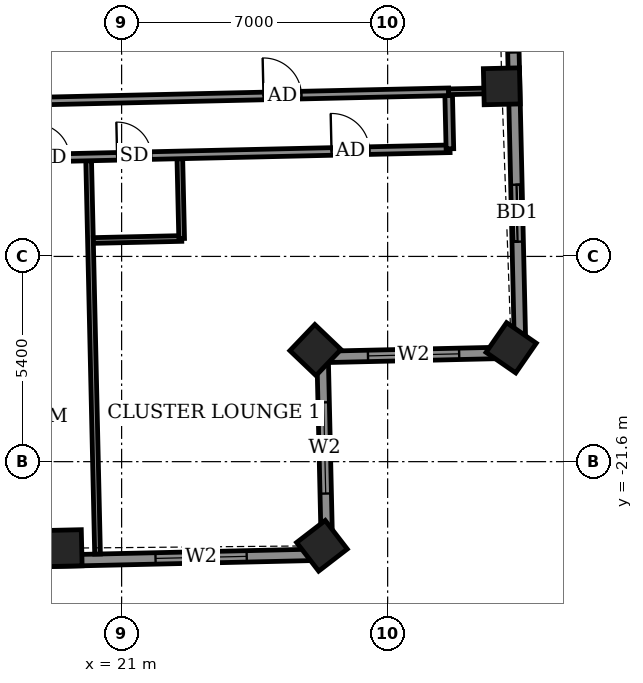
"""IFC4 building model, lengths in metres.
Left out: names, types, materials, properties, quantities, classifications, styles, units other than length and angle.
Written with IfcOpenShell. Run it as: python <this file> out.ifc"""

import sys

from ifc_helpers import new_model, si_unit, direction, frame, frame_2d, origin, origin_2d, place, context, subcontext, project, spatial, rectangle, extrude, element, fill, save


model = new_model("IFC4")
c1 = context("Model", 3, precision=1e-05, world=origin(), true_north=direction((0.0, 1.0)))
c2 = subcontext(c1, "Body", "Model", "MODEL_VIEW")
j1 = project(units=[si_unit("LENGTHUNIT", "METRE"), si_unit("PLANEANGLEUNIT", "RADIAN")], contexts=[c1])
p1 = place(None, origin())
s1 = spatial("IfcSite", under=j1, at=p1, CompositionType="ELEMENT")
p2 = place(p1, origin())
s2 = spatial("IfcBuilding", under=s1, at=p2, CompositionType="ELEMENT")
p3 = place(p2, frame((0.0, 0.0, 290.7)))
s3 = spatial("IfcBuildingStorey", under=s2, at=p3, CompositionType="ELEMENT", Elevation=290.7)
for number, where, z_axis, x_axis in (
    (1, (19.475, -23.876, -0.55), (0.0, 0.0, 1.0), (1.0, 0.023, 0.0)),
    (2, (26.271, -23.814, -0.55), (0.0, 0.0, 1.0), (0.792, 0.61, 0.0)),
    (3, (26.1, -18.664, -0.55), (0.0, 0.0, 1.0), (0.691, 0.723, 0.0)),
    (4, (31.25, -18.604, -0.55), (0.0, 0.0, 1.0), (0.569, 0.822, 0.0)),
    (5, (31.004, -11.724, -0.55), (0.0, 0.0, 1.0), (-0.023, 1.0, 0.0)),
):
    element("IfcColumn", number, at=place(p3, frame(where, z_axis=z_axis, x_axis=x_axis)), inside=s3, PredefinedType="COLUMN", context=c2, shape_type="SweptSolid", body=[
        extrude(rectangle(XDim=0.95, YDim=0.95, at=origin_2d()), origin(), (0.0, 0.0, 1.0), 3.6),
    ])
p4 = place(p3, frame((31.488, -18.727, 0.0), z_axis=(0.0, 0.0, 1.0), x_axis=(-0.022666132143, 0.999743090226, 0.0)))
e6 = element("IfcWall", 6, at=p4, inside=s3, PredefinedType="SOLIDWALL", context=c2, shape_type="SweptSolid", body=[
    extrude(rectangle(XDim=14.649, YDim=0.3, at=frame_2d((7.324, 0.0))), origin(), (0.0, 0.0, 1.0), 2.5),
])
p5 = place(p4, frame((2.915, 0.0, 0.0)))
e7 = element("IfcOpeningElement", 7, at=p5, cuts=e6, PredefinedType="OPENING", context=c2, shape_type="SweptSolid", body=[
    extrude(rectangle(XDim=1.5, YDim=2.4, at=frame_2d((0.75, 1.2))), frame((0.0, 0.16, 0.0), z_axis=(0.0, -1.0, 0.0), x_axis=(1.0, 0.0, 0.0)), (0.0, 0.0, 1.0), 0.32),
])
p6 = place(p4, frame((7.895, 0.0, 0.9)))
e8 = element("IfcOpeningElement", 8, at=p6, cuts=e6, PredefinedType="OPENING", context=c2, shape_type="SweptSolid", body=[
    extrude(rectangle(XDim=2.4, YDim=1.5, at=frame_2d((1.2, 0.75))), frame((0.0, 0.16, 0.0), z_axis=(0.0, -1.0, 0.0), x_axis=(1.0, 0.0, 0.0)), (0.0, 0.0, 1.0), 0.32),
])
p7 = place(p3, frame((-22.816, -25.161, 0.0), z_axis=(0.0, 0.0, 1.0), x_axis=(0.999742646411, 0.022685699159, 0.0)))
e9 = element("IfcWall", 9, at=p7, inside=s3, PredefinedType="SOLIDWALL", context=c2, shape_type="SweptSolid", body=[
    extrude(rectangle(XDim=49.236, YDim=0.3, at=frame_2d((24.618, 0.0))), origin(), (0.0, 0.0, 1.0), 2.5),
])
p8 = place(p7, frame((0.953, 0.0, 0.0)))
e10 = element("IfcOpeningElement", 10, at=p8, cuts=e9, PredefinedType="OPENING", context=c2, shape_type="SweptSolid", body=[
    extrude(rectangle(XDim=1.5, YDim=2.4, at=frame_2d((0.75, 1.2))), frame((0.0, 0.16, 0.0), z_axis=(0.0, -1.0, 0.0), x_axis=(1.0, 0.0, 0.0)), (0.0, 0.0, 1.0), 0.32),
])
p9 = place(p7, frame((4.051, 0.0, 0.0)))
e11 = element("IfcOpeningElement", 11, at=p9, cuts=e9, PredefinedType="OPENING", context=c2, shape_type="SweptSolid", body=[
    extrude(rectangle(XDim=1.5, YDim=2.4, at=frame_2d((0.75, 1.2))), frame((0.0, 0.16, 0.0), z_axis=(0.0, -1.0, 0.0), x_axis=(1.0, 0.0, 0.0)), (0.0, 0.0, 1.0), 0.32),
])
p10 = place(p7, frame((8.725, 0.0, 0.0)))
e12 = element("IfcOpeningElement", 12, at=p10, cuts=e9, PredefinedType="OPENING", context=c2, shape_type="SweptSolid", body=[
    extrude(rectangle(XDim=1.5, YDim=2.4, at=frame_2d((0.75, 1.2))), frame((0.0, 0.16, 0.0), z_axis=(0.0, -1.0, 0.0), x_axis=(1.0, 0.0, 0.0)), (0.0, 0.0, 1.0), 0.32),
])
p11 = place(p7, frame((12.139, 0.0, 0.0)))
e13 = element("IfcOpeningElement", 13, at=p11, cuts=e9, PredefinedType="OPENING", context=c2, shape_type="SweptSolid", body=[
    extrude(rectangle(XDim=1.2, YDim=2.4, at=frame_2d((0.6, 1.2))), frame((0.0, 0.16, 0.0), z_axis=(0.0, -1.0, 0.0), x_axis=(1.0, 0.0, 0.0)), (0.0, 0.0, 1.0), 0.32),
])
p12 = place(p7, frame((17.6, 0.0, 0.0)))
e14 = element("IfcOpeningElement", 14, at=p12, cuts=e9, PredefinedType="OPENING", context=c2, shape_type="SweptSolid", body=[
    extrude(rectangle(XDim=1.5, YDim=2.4, at=frame_2d((0.75, 1.2))), frame((0.0, 0.16, 0.0), z_axis=(0.0, -1.0, 0.0), x_axis=(1.0, 0.0, 0.0)), (0.0, 0.0, 1.0), 0.32),
])
p13 = place(p7, frame((22.453, 0.0, 0.0)))
e15 = element("IfcOpeningElement", 15, at=p13, cuts=e9, PredefinedType="OPENING", context=c2, shape_type="SweptSolid", body=[
    extrude(rectangle(XDim=1.5, YDim=2.4, at=frame_2d((0.75, 1.2))), frame((0.0, 0.16, 0.0), z_axis=(0.0, -1.0, 0.0), x_axis=(1.0, 0.0, 0.0)), (0.0, 0.0, 1.0), 0.32),
])
p14 = place(p7, frame((25.765, 0.0, 0.0)))
e16 = element("IfcOpeningElement", 16, at=p14, cuts=e9, PredefinedType="OPENING", context=c2, shape_type="SweptSolid", body=[
    extrude(rectangle(XDim=1.5, YDim=2.4, at=frame_2d((0.75, 1.2))), frame((0.0, 0.16, 0.0), z_axis=(0.0, -1.0, 0.0), x_axis=(1.0, 0.0, 0.0)), (0.0, 0.0, 1.0), 0.32),
])
p15 = place(p7, frame((31.25, 0.0, 0.0)))
e17 = element("IfcOpeningElement", 17, at=p15, cuts=e9, PredefinedType="OPENING", context=c2, shape_type="SweptSolid", body=[
    extrude(rectangle(XDim=1.5, YDim=2.4, at=frame_2d((0.75, 1.2))), frame((0.0, 0.16, 0.0), z_axis=(0.0, -1.0, 0.0), x_axis=(1.0, 0.0, 0.0)), (0.0, 0.0, 1.0), 0.32),
])
p16 = place(p7, frame((36.429, 0.0, 0.0)))
e18 = element("IfcOpeningElement", 18, at=p16, cuts=e9, PredefinedType="OPENING", context=c2, shape_type="SweptSolid", body=[
    extrude(rectangle(XDim=1.5, YDim=2.4, at=frame_2d((0.75, 1.2))), frame((0.0, 0.16, 0.0), z_axis=(0.0, -1.0, 0.0), x_axis=(1.0, 0.0, 0.0)), (0.0, 0.0, 1.0), 0.32),
])
p17 = place(p7, frame((39.742, 0.0, 0.0)))
e19 = element("IfcOpeningElement", 19, at=p17, cuts=e9, PredefinedType="OPENING", context=c2, shape_type="SweptSolid", body=[
    extrude(rectangle(XDim=1.5, YDim=2.4, at=frame_2d((0.75, 1.2))), frame((0.0, 0.16, 0.0), z_axis=(0.0, -1.0, 0.0), x_axis=(1.0, 0.0, 0.0)), (0.0, 0.0, 1.0), 0.32),
])
p18 = place(p7, frame((44.72, 0.0, 0.9)))
e20 = element("IfcOpeningElement", 20, at=p18, cuts=e9, PredefinedType="OPENING", context=c2, shape_type="SweptSolid", body=[
    extrude(rectangle(XDim=2.4, YDim=1.5, at=frame_2d((1.2, 0.75))), frame((0.0, 0.16, 0.0), z_axis=(0.0, -1.0, 0.0), x_axis=(1.0, 0.0, 0.0)), (0.0, 0.0, 1.0), 0.32),
])
p19 = place(p3, frame((26.407, -24.044, 0.0), z_axis=(0.0, 0.0, 1.0), x_axis=(-0.022675548694, 0.99974287669, 0.0)))
e21 = element("IfcWall", 21, at=p19, inside=s3, PredefinedType="SOLIDWALL", context=c2, shape_type="SweptSolid", body=[
    extrude(rectangle(XDim=5.2, YDim=0.3, at=frame_2d((2.6, 0.0))), origin(), (0.0, 0.0, 1.0), 2.55),
])
p20 = place(p19, frame((1.605, 0.0, 0.9)))
e22 = element("IfcOpeningElement", 22, at=p20, cuts=e21, PredefinedType="OPENING", context=c2, shape_type="SweptSolid", body=[
    extrude(rectangle(XDim=2.4, YDim=1.5, at=frame_2d((1.2, 0.75))), frame((0.0, 0.16, 0.0), z_axis=(0.0, -1.0, 0.0), x_axis=(1.0, 0.0, 0.0)), (0.0, 0.0, 1.0), 0.32),
])
p21 = place(p3, frame((26.289, -18.845, 0.0), z_axis=(0.0, 0.0, 1.0), x_axis=(0.99974287669, 0.022675548694, 0.0)))
e23 = element("IfcWall", 23, at=p21, inside=s3, PredefinedType="SOLIDWALL", context=c2, shape_type="SweptSolid", body=[
    extrude(rectangle(XDim=5.2, YDim=0.3, at=frame_2d((2.6, 0.0))), origin(), (0.0, 0.0, 1.0), 2.55),
])
p22 = place(p21, frame((1.194, 0.0, 0.9)))
e24 = element("IfcOpeningElement", 24, at=p22, cuts=e23, PredefinedType="OPENING", context=c2, shape_type="SweptSolid", body=[
    extrude(rectangle(XDim=2.4, YDim=1.5, at=frame_2d((1.2, 0.75))), frame((0.0, 0.16, 0.0), z_axis=(0.0, -1.0, 0.0), x_axis=(1.0, 0.0, 0.0)), (0.0, 0.0, 1.0), 0.32),
])
p23 = place(p3, frame((20.367, -24.031, 0.0), z_axis=(0.0, 0.0, 1.0), x_axis=(-0.022596564565, 0.999744665037, 0.0)))
e25 = element("IfcWall", 25, at=p23, inside=s3, PredefinedType="PARTITIONING", context=c2, shape_type="SweptSolid", body=[
    extrude(rectangle(XDim=10.351, YDim=0.15, at=frame_2d((5.175, 0.0))), origin(), (0.0, 0.0, 1.0), 2.55),
])
p24 = place(p3, frame((20.257, -15.781, 0.0), z_axis=(0.0, 0.0, 1.0), x_axis=(0.999740478815, 0.022781023197, 0.0)))
e26 = element("IfcWall", 26, at=p24, inside=s3, PredefinedType="PARTITIONING", context=c2, shape_type="SweptSolid", body=[
    extrude(rectangle(XDim=2.325, YDim=0.15, at=frame_2d((1.163, 0.0))), origin(), (0.0, 0.0, 1.0), 3.05),
])
p25 = place(p3, frame((22.58, -15.729, 0.0), z_axis=(0.0, 0.0, 1.0), x_axis=(-0.022895647347, 0.999737860308, 0.0)))
e27 = element("IfcWall", 27, at=p25, inside=s3, PredefinedType="PARTITIONING", context=c2, shape_type="SweptSolid", body=[
    extrude(rectangle(XDim=2.101, YDim=0.15, at=frame_2d((1.05, 0.0))), origin(), (0.0, 0.0, 1.0), 3.05),
])
p26 = place(p3, frame((-25.731, -14.624, 0.0), z_axis=(0.0, 0.0, 1.0), x_axis=(0.999742799525, 0.022678950563, 0.0)))
e28 = element("IfcWall", 28, at=p26, inside=s3, PredefinedType="PARTITIONING", context=c2, shape_type="SweptSolid", body=[
    extrude(rectangle(XDim=55.386, YDim=0.2, at=frame_2d((27.693, 0.0))), origin(), (0.0, 0.0, 1.0), 3.05),
])
p27 = place(p26, frame((1.691, 0.0, 0.0)))
e29 = element("IfcOpeningElement", 29, at=p27, cuts=e28, PredefinedType="OPENING", context=c2, shape_type="SweptSolid", body=[
    extrude(rectangle(XDim=1.0, YDim=2.1, at=frame_2d((0.5, 1.05))), frame((0.0, 0.11, 0.0), z_axis=(0.0, -1.0, 0.0), x_axis=(1.0, 0.0, 0.0)), (0.0, 0.0, 1.0), 0.22),
])
p28 = place(p26, frame((8.5, 0.0, 0.0)))
e30 = element("IfcOpeningElement", 30, at=p28, cuts=e28, PredefinedType="OPENING", context=c2, shape_type="SweptSolid", body=[
    extrude(rectangle(XDim=0.9, YDim=2.1, at=frame_2d((0.45, 1.05))), frame((0.0, 0.11, 0.0), z_axis=(0.0, -1.0, 0.0), x_axis=(1.0, 0.0, 0.0)), (0.0, 0.0, 1.0), 0.22),
])
p29 = place(p26, frame((10.5, 0.0, 0.0)))
e31 = element("IfcOpeningElement", 31, at=p29, cuts=e28, PredefinedType="OPENING", context=c2, shape_type="SweptSolid", body=[
    extrude(rectangle(XDim=0.9, YDim=2.1, at=frame_2d((0.45, 1.05))), frame((0.0, 0.11, 0.0), z_axis=(0.0, -1.0, 0.0), x_axis=(1.0, 0.0, 0.0)), (0.0, 0.0, 1.0), 0.22),
])
p30 = place(p26, frame((17.325, 0.0, 0.0)))
e32 = element("IfcOpeningElement", 32, at=p30, cuts=e28, PredefinedType="OPENING", context=c2, shape_type="SweptSolid", body=[
    extrude(rectangle(XDim=0.9, YDim=2.1, at=frame_2d((0.45, 1.05))), frame((0.0, 0.11, 0.0), z_axis=(0.0, -1.0, 0.0), x_axis=(1.0, 0.0, 0.0)), (0.0, 0.0, 1.0), 0.22),
])
p31 = place(p26, frame((19.375, 0.0, 0.0)))
e33 = element("IfcOpeningElement", 33, at=p31, cuts=e28, PredefinedType="OPENING", context=c2, shape_type="SweptSolid", body=[
    extrude(rectangle(XDim=0.9, YDim=2.1, at=frame_2d((0.45, 1.05))), frame((0.0, 0.11, 0.0), z_axis=(0.0, -1.0, 0.0), x_axis=(1.0, 0.0, 0.0)), (0.0, 0.0, 1.0), 0.22),
])
p32 = place(p26, frame((26.275, 0.0, 0.0)))
e34 = element("IfcOpeningElement", 34, at=p32, cuts=e28, PredefinedType="OPENING", context=c2, shape_type="SweptSolid", body=[
    extrude(rectangle(XDim=0.9, YDim=2.1, at=frame_2d((0.45, 1.05))), frame((0.0, 0.11, 0.0), z_axis=(0.0, -1.0, 0.0), x_axis=(1.0, 0.0, 0.0)), (0.0, 0.0, 1.0), 0.22),
])
p33 = place(p26, frame((28.425, 0.0, 0.0)))
e35 = element("IfcOpeningElement", 35, at=p33, cuts=e28, PredefinedType="OPENING", context=c2, shape_type="SweptSolid", body=[
    extrude(rectangle(XDim=0.9, YDim=2.1, at=frame_2d((0.45, 1.05))), frame((0.0, 0.11, 0.0), z_axis=(0.0, -1.0, 0.0), x_axis=(1.0, 0.0, 0.0)), (0.0, 0.0, 1.0), 0.22),
])
p34 = place(p26, frame((35.425, 0.0, 0.0)))
e36 = element("IfcOpeningElement", 36, at=p34, cuts=e28, PredefinedType="OPENING", context=c2, shape_type="SweptSolid", body=[
    extrude(rectangle(XDim=0.9, YDim=2.1, at=frame_2d((0.45, 1.05))), frame((0.0, 0.11, 0.0), z_axis=(0.0, -1.0, 0.0), x_axis=(1.0, 0.0, 0.0)), (0.0, 0.0, 1.0), 0.22),
])
p35 = place(p26, frame((37.625, 0.0, 0.0)))
e37 = element("IfcOpeningElement", 37, at=p35, cuts=e28, PredefinedType="OPENING", context=c2, shape_type="SweptSolid", body=[
    extrude(rectangle(XDim=0.9, YDim=2.1, at=frame_2d((0.45, 1.05))), frame((0.0, 0.11, 0.0), z_axis=(0.0, -1.0, 0.0), x_axis=(1.0, 0.0, 0.0)), (0.0, 0.0, 1.0), 0.22),
])
p36 = place(p26, frame((44.475, 0.0, 0.0)))
e38 = element("IfcOpeningElement", 38, at=p36, cuts=e28, PredefinedType="OPENING", context=c2, shape_type="SweptSolid", body=[
    extrude(rectangle(XDim=0.9, YDim=2.1, at=frame_2d((0.45, 1.05))), frame((0.0, 0.11, 0.0), z_axis=(0.0, -1.0, 0.0), x_axis=(1.0, 0.0, 0.0)), (0.0, 0.0, 1.0), 0.22),
])
p37 = place(p26, frame((52.268, 0.0, 0.0)))
e39 = element("IfcOpeningElement", 39, at=p37, cuts=e28, PredefinedType="OPENING", context=c2, shape_type="SweptSolid", body=[
    extrude(rectangle(XDim=1.0, YDim=2.1, at=frame_2d((0.5, 1.05))), frame((0.0, 0.11, 0.0), z_axis=(0.0, -1.0, 0.0), x_axis=(1.0, 0.0, 0.0)), (0.0, 0.0, 1.0), 0.22),
])
p38 = place(p26, frame((46.625, 0.0, 0.0)))
e40 = element("IfcOpeningElement", 40, at=p38, cuts=e28, PredefinedType="OPENING", context=c2, shape_type="SweptSolid", body=[
    extrude(rectangle(XDim=0.9, YDim=2.1, at=frame_2d((0.45, 1.05))), frame((0.0, 0.11, 0.0), z_axis=(0.0, -1.0, 0.0), x_axis=(1.0, 0.0, 0.0)), (0.0, 0.0, 1.0), 0.22),
])
p39 = place(p3, frame((29.638, -13.368, 0.0), z_axis=(0.0, 0.0, 1.0), x_axis=(-0.022617910375, 0.999744182344, 0.0)))
e41 = element("IfcWall", 41, at=p39, inside=s3, PredefinedType="PARTITIONING", context=c2, shape_type="SweptSolid", body=[
    extrude(rectangle(XDim=1.5, YDim=0.2, at=frame_2d((0.75, 0.0))), origin(), (0.0, 0.0, 1.0), 3.05),
])
p40 = place(p3, frame((18.985, -12.109, 0.0), z_axis=(0.0, 0.0, 1.0), x_axis=(0.999742771882, 0.022680169073, 0.0)))
e42 = element("IfcWall", 42, at=p40, inside=s3, PredefinedType="PARTITIONING", context=c2, shape_type="SweptSolid", body=[
    extrude(rectangle(XDim=10.625, YDim=0.2, at=frame_2d((5.312, 0.0))), origin(), (0.0, 0.0, 1.0), 3.05),
])
p41 = place(p40, frame((5.75, 0.0, 0.0)))
e43 = element("IfcOpeningElement", 43, at=p41, cuts=e42, PredefinedType="OPENING", context=c2, shape_type="SweptSolid", body=[
    extrude(rectangle(XDim=1.0, YDim=2.1, at=frame_2d((0.5, 1.05))), frame((0.0, 0.11, 0.0), z_axis=(0.0, -1.0, 0.0), x_axis=(1.0, 0.0, 0.0)), (0.0, 0.0, 1.0), 0.22),
])
p42 = place(p3, frame((29.603, -11.868, 0.0), z_axis=(0.0, 0.0, 1.0), x_axis=(0.999741755729, 0.022724916977, 0.0)))
e44 = element("IfcWall", 44, at=p42, inside=s3, PredefinedType="PARTITIONING", context=c2, shape_type="SweptSolid", body=[
    extrude(rectangle(XDim=1.579, YDim=0.15, at=frame_2d((0.79, 0.0))), origin(), (0.0, 0.0, 1.0), 3.05),
])
p43 = place(p5, origin())
e45 = element("IfcDoor", 45, at=p43, inside=s3, OperationType="SLIDING_TO_LEFT", PredefinedType="DOOR", context=c2, shape_type="SweptSolid", body=[
    extrude(rectangle(XDim=1.5, YDim=2.4, at=frame_2d((0.75, 1.2))), frame((0.0, 0.025, 0.0), z_axis=(0.0, -1.0, 0.0), x_axis=(1.0, 0.0, 0.0)), (0.0, 0.0, 1.0), 0.05),
])
fill(e7, e45)
p44 = place(p6, origin())
e46 = element("IfcWindow", 46, at=p44, inside=s3, PartitioningType="DOUBLE_PANEL_VERTICAL", PredefinedType="WINDOW", context=c2, shape_type="SweptSolid", body=[
    extrude(rectangle(XDim=2.4, YDim=1.5, at=frame_2d((1.2, 0.75))), frame((0.0, 0.03, 0.0), z_axis=(0.0, -1.0, 0.0), x_axis=(1.0, 0.0, 0.0)), (0.0, 0.0, 1.0), 0.06),
])
fill(e8, e46)
p45 = place(p18, origin())
e47 = element("IfcWindow", 47, at=p45, inside=s3, PartitioningType="DOUBLE_PANEL_VERTICAL", PredefinedType="WINDOW", context=c2, shape_type="SweptSolid", body=[
    extrude(rectangle(XDim=2.4, YDim=1.5, at=frame_2d((1.2, 0.75))), frame((0.0, 0.03, 0.0), z_axis=(0.0, -1.0, 0.0), x_axis=(1.0, 0.0, 0.0)), (0.0, 0.0, 1.0), 0.06),
])
fill(e20, e47)
p46 = place(p20, origin())
e48 = element("IfcWindow", 48, at=p46, inside=s3, PartitioningType="DOUBLE_PANEL_VERTICAL", PredefinedType="WINDOW", context=c2, shape_type="SweptSolid", body=[
    extrude(rectangle(XDim=2.4, YDim=1.5, at=frame_2d((1.2, 0.75))), frame((0.0, 0.03, 0.0), z_axis=(0.0, -1.0, 0.0), x_axis=(1.0, 0.0, 0.0)), (0.0, 0.0, 1.0), 0.06),
])
fill(e22, e48)
p47 = place(p22, origin())
e49 = element("IfcWindow", 49, at=p47, inside=s3, PartitioningType="DOUBLE_PANEL_VERTICAL", PredefinedType="WINDOW", context=c2, shape_type="SweptSolid", body=[
    extrude(rectangle(XDim=2.4, YDim=1.5, at=frame_2d((1.2, 0.75))), frame((0.0, 0.03, 0.0), z_axis=(0.0, -1.0, 0.0), x_axis=(1.0, 0.0, 0.0)), (0.0, 0.0, 1.0), 0.06),
])
fill(e24, e49)
p48 = place(p36, origin())
e50 = element("IfcDoor", 50, at=p48, inside=s3, OperationType="SINGLE_SWING_LEFT", PredefinedType="DOOR", context=c2, shape_type="SweptSolid", body=[
    extrude(rectangle(XDim=0.9, YDim=2.1, at=frame_2d((0.45, 1.05))), frame((0.0, 0.025, 0.0), z_axis=(0.0, -1.0, 0.0), x_axis=(1.0, 0.0, 0.0)), (0.0, 0.0, 1.0), 0.05),
])
fill(e38, e50)
p49 = place(p37, origin())
e51 = element("IfcDoor", 51, at=p49, inside=s3, OperationType="SINGLE_SWING_RIGHT", PredefinedType="DOOR", context=c2, shape_type="SweptSolid", body=[
    extrude(rectangle(XDim=1.0, YDim=2.1, at=frame_2d((0.5, 1.05))), frame((0.0, 0.025, 0.0), z_axis=(0.0, -1.0, 0.0), x_axis=(1.0, 0.0, 0.0)), (0.0, 0.0, 1.0), 0.05),
])
fill(e39, e51)
p50 = place(p38, origin())
e52 = element("IfcDoor", 52, at=p50, inside=s3, OperationType="SINGLE_SWING_LEFT", PredefinedType="DOOR", context=c2, shape_type="SweptSolid", body=[
    extrude(rectangle(XDim=0.9, YDim=2.1, at=frame_2d((0.45, 1.05))), frame((0.0, 0.025, 0.0), z_axis=(0.0, -1.0, 0.0), x_axis=(1.0, 0.0, 0.0)), (0.0, 0.0, 1.0), 0.05),
])
fill(e40, e52)
p51 = place(p41, origin())
e53 = element("IfcDoor", 53, at=p51, inside=s3, OperationType="SINGLE_SWING_LEFT", PredefinedType="DOOR", context=c2, shape_type="SweptSolid", body=[
    extrude(rectangle(XDim=1.0, YDim=2.1, at=frame_2d((0.5, 1.05))), frame((0.0, 0.025, 0.0), z_axis=(0.0, -1.0, 0.0), x_axis=(1.0, 0.0, 0.0)), (0.0, 0.0, 1.0), 0.05),
])
fill(e43, e53)
save(model, sys.argv[1])
